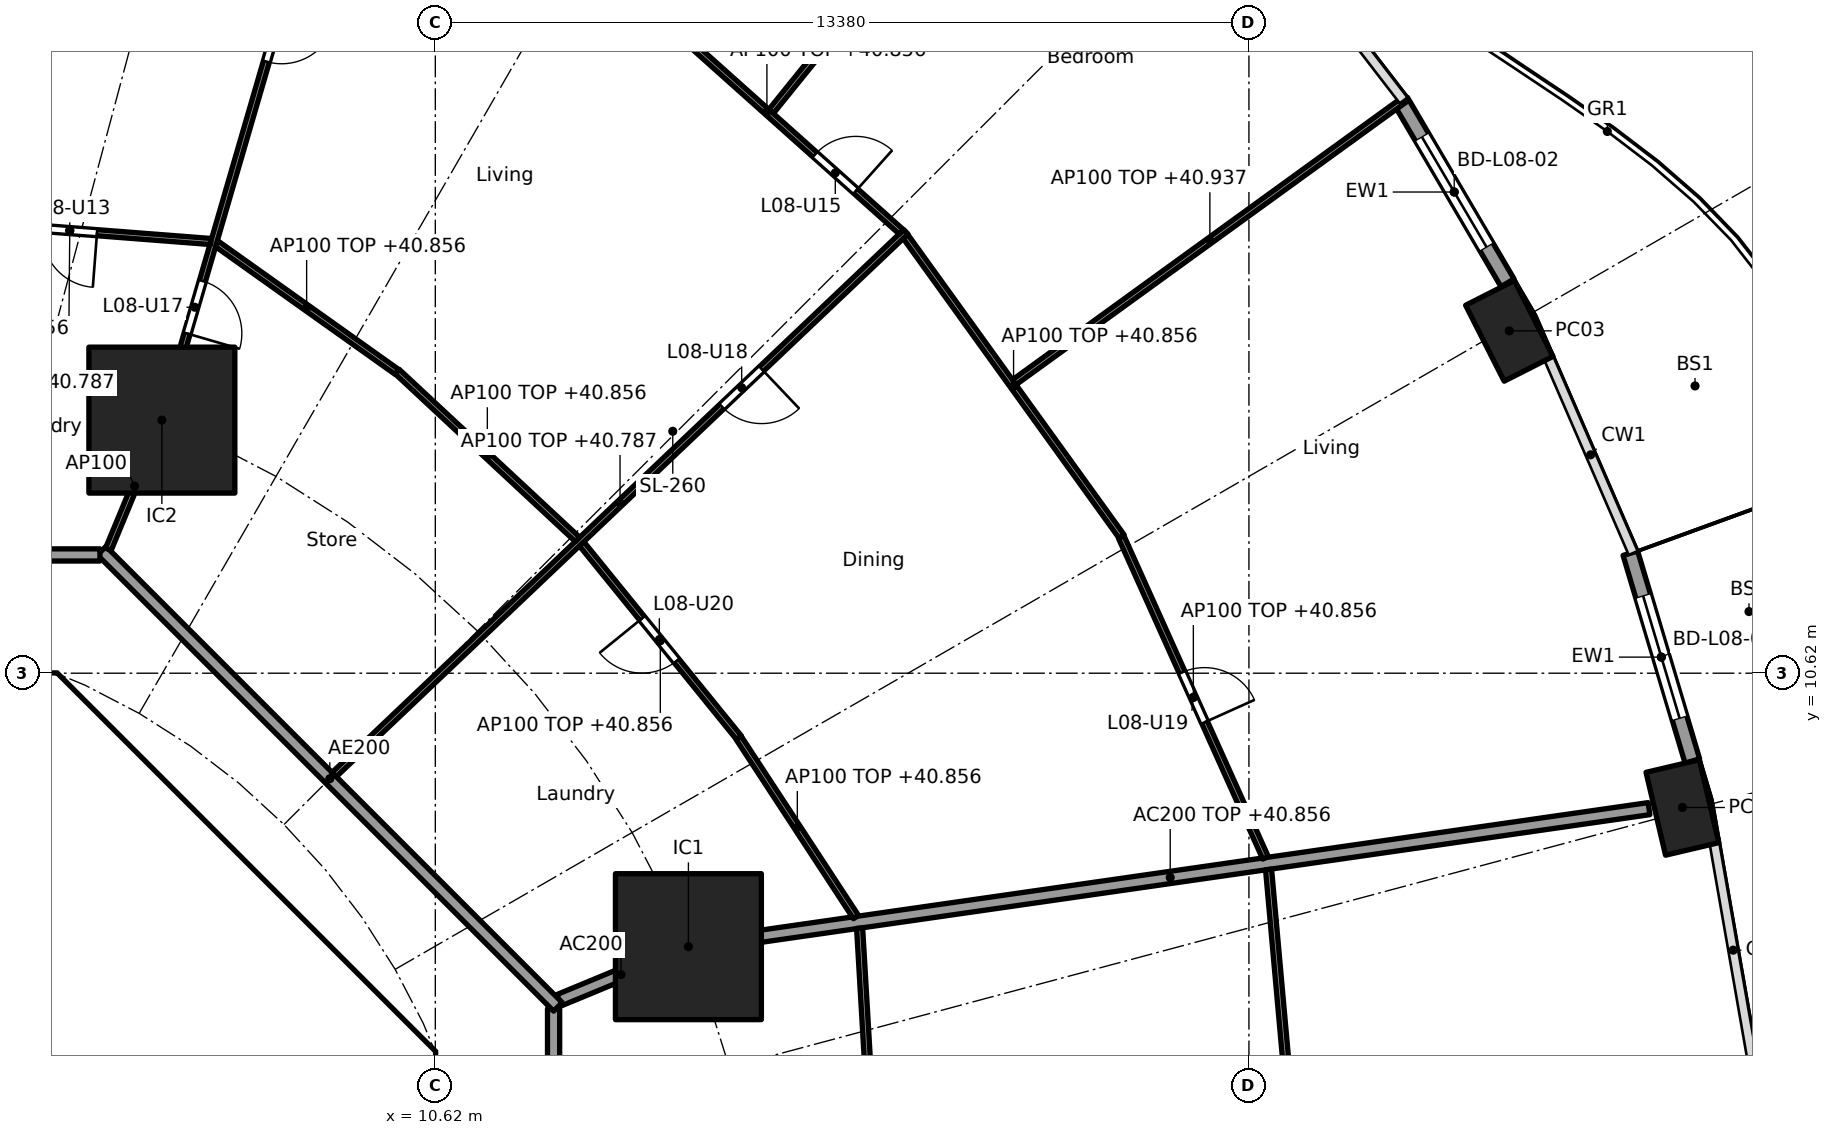
"""IFC4 building model, lengths in metres.
Left out: names, types, materials, properties, quantities, classifications, styles, units other than length and angle.
Written with IfcOpenShell. Run it as: python <this file> out.ifc"""

import sys

from ifc_helpers import new_model, si_unit, direction, frame, frame_2d, origin, origin_2d, place, context, subcontext, project, spatial, polyline, rectangle, hollow_rectangle, outline, extrude, element, fill, save


model = new_model("IFC4")
c1 = context("Model", 3, precision=1e-05, world=origin(), true_north=direction((0.0, 1.0)))
c2 = subcontext(c1, "Body", "Model", "MODEL_VIEW")
j1 = project(units=[si_unit("LENGTHUNIT", "METRE"), si_unit("PLANEANGLEUNIT", "RADIAN")], contexts=[c1])
p1 = place(None, origin())
s1 = spatial("IfcSite", under=j1, at=p1, CompositionType="ELEMENT")
p2 = place(p1, origin())
s2 = spatial("IfcBuilding", under=s1, at=p2, CompositionType="ELEMENT")
p3 = place(p2, frame((0.0, 0.0, 38.1)))
s3 = spatial("IfcBuildingStorey", under=s2, at=p3, CompositionType="ELEMENT", Elevation=38.1)
for number, where, z_axis, x_axis in (
    (1, (31.129, 8.412, 0.0), (0.0, 0.0, 1.0), (-0.229, 0.973, 0.0)),
    (2, (28.282, 16.25, 0.0), (0.0, 0.0, 1.0), (-0.452, 0.892, 0.0)),
):
    element("IfcColumn", number, at=place(p3, frame(where, z_axis=z_axis, x_axis=x_axis)), inside=s3, PredefinedType="COLUMN", context=c2, shape_type="SweptSolid", body=[
        extrude(hollow_rectangle(XDim=1.4, YDim=0.9, WallThickness=0.05, at=origin_2d()), origin(), (0.0, 0.0, 1.0), 3.7),
    ])
for number, where, z_axis, x_axis in (
    (3, (14.782, 6.123, 0.0), (0.0, 0.0, 1.0), (1.0, 0.0, 0.0)),
    (4, (6.123, 14.782, 0.0), (0.0, 0.0, 1.0), (1.0, 0.0, 0.0)),
):
    element("IfcColumn", number, at=place(p3, frame(where, z_axis=z_axis, x_axis=x_axis)), inside=s3, PredefinedType="COLUMN", context=c2, shape_type="SweptSolid", body=[
        extrude(rectangle(XDim=2.4, YDim=2.4, at=origin_2d()), origin(), (0.0, 0.0, 1.0), 3.7),
    ])
p4 = place(p3, frame((30.273, 12.593, 0.0), z_axis=(0.0, 0.0, 1.0), x_axis=(0.285871309426, -0.958268018065, 0.0)))
e5 = element("IfcWall", 5, at=p4, inside=s3, PredefinedType="SOLIDWALL", context=c2, shape_type="SweptSolid", body=[
    extrude(rectangle(XDim=3.565, YDim=0.25, at=frame_2d((1.783, 0.0))), origin(), (0.0, 0.0, 1.0), 3.44),
])
p5 = place(p4, frame((0.733, 0.0, 0.0)))
e6 = element("IfcOpeningElement", 6, at=p5, cuts=e5, PredefinedType="OPENING", context=c2, shape_type="SweptSolid", body=[
    extrude(rectangle(XDim=2.1, YDim=2.4, at=frame_2d((1.05, 1.2))), frame((0.0, 0.135, 0.0), z_axis=(0.0, -1.0, 0.0), x_axis=(1.0, 0.0, 0.0)), (0.0, 0.0, 1.0), 0.27),
])
p6 = place(p3, frame((26.5, 20.026, 0.0), z_axis=(0.0, 0.0, 1.0), x_axis=(0.506311160839, -0.862350861546, 0.0)))
e7 = element("IfcWall", 7, at=p6, inside=s3, PredefinedType="SOLIDWALL", context=c2, shape_type="SweptSolid", body=[
    extrude(rectangle(XDim=3.462, YDim=0.25, at=frame_2d((1.731, 0.0))), origin(), (0.0, 0.0, 1.0), 3.44),
])
p7 = place(p6, frame((0.681, 0.0, 0.0)))
e8 = element("IfcOpeningElement", 8, at=p7, cuts=e7, PredefinedType="OPENING", context=c2, shape_type="SweptSolid", body=[
    extrude(rectangle(XDim=2.1, YDim=2.4, at=frame_2d((1.05, 1.2))), frame((0.0, 0.135, 0.0), z_axis=(0.0, -1.0, 0.0), x_axis=(1.0, 0.0, 0.0)), (0.0, 0.0, 1.0), 0.27),
])
p8 = place(p3, frame((9.988, 4.613, 0.0), z_axis=(0.0, 0.0, 1.0), x_axis=(-0.707106781187, 0.707106781187, 0.0)))
e9 = element("IfcWall", 9, at=p8, inside=s3, PredefinedType="SHEAR", context=c2, shape_type="SweptSolid", body=[
    extrude(rectangle(XDim=7.602, YDim=0.6, at=frame_2d((3.801, 0.0))), origin(), (0.0, 0.0, 1.0), 3.44),
])
p9 = place(p8, frame((3.201, 0.0, 0.0)))
e10 = element("IfcOpeningElement", 10, at=p9, cuts=e9, PredefinedType="OPENING", context=c2, shape_type="SweptSolid", body=[
    extrude(rectangle(XDim=1.2, YDim=2.1, at=frame_2d((0.6, 1.05))), frame((0.0, 0.31, 0.0), z_axis=(0.0, -1.0, 0.0), x_axis=(1.0, 0.0, 0.0)), (0.0, 0.0, 1.0), 0.62),
])
p10 = place(p3, origin())
e11 = element("IfcWall", 11, at=p10, inside=s3, PredefinedType="SHEAR", context=c2, shape_type="SweptSolid", body=[
    extrude(outline(polyline([(-4.152, 10.025), (-4.401, 9.776), (-4.825, 10.2), (-4.401, 10.625), (4.401, 10.625), (4.825, 10.2), (4.401, 9.776), (4.152, 10.025), (-4.152, 10.025)])), origin(), (0.0, 0.0, 1.0), 3.44),
])
p11 = place(p3, origin())
e12 = element("IfcWall", 12, at=p11, inside=s3, PredefinedType="SHEAR", context=c2, shape_type="SweptSolid", body=[
    extrude(outline(polyline([(9.776, -4.401), (10.025, -4.152), (10.025, -3.801), (10.025, 4.152), (9.776, 4.401), (10.2, 4.825), (10.625, 4.401), (10.625, -4.401), (10.2, -4.825), (9.776, -4.401)])), origin(), (0.0, 0.0, 1.0), 3.44),
])
p12 = place(p3, frame((12.657, 5.243, 0.0), z_axis=(0.0, 0.0, 1.0), x_axis=(0.923853160736, 0.382747093259, 0.0)))
e13 = element("IfcWall", 13, at=p12, inside=s3, PredefinedType="PARTITIONING", context=c2, shape_type="SweptSolid", body=[
    extrude(rectangle(XDim=2.2, YDim=0.2, at=frame_2d((1.1, 0.0))), origin(), (0.0, 0.0, 1.0), 3.44),
])
p13 = place(p3, frame((14.832, 6.13, 0.0), z_axis=(0.0, 0.0, 1.0), x_axis=(0.989836541293, 0.142209779978, 0.0)))
e14 = element("IfcWall", 14, at=p13, inside=s3, PredefinedType="PARTITIONING", context=c2, shape_type="SweptSolid", body=[
    extrude(rectangle(XDim=15.909, YDim=0.2, at=frame_2d((7.955, 0.0))), origin(), (0.0, 0.0, 1.0), 2.756),
])
p14 = place(p3, frame((12.565, -5.104, 0.0), z_axis=(0.0, 0.0, 1.0), x_axis=(0.0, 1.0, 0.0)))
e15 = element("IfcWall", 15, at=p14, inside=s3, PredefinedType="PARTITIONING", context=c2, shape_type="SweptSolid", body=[
    extrude(rectangle(XDim=10.209, YDim=0.2, at=frame_2d((5.104, 0.0))), origin(), (0.0, 0.0, 1.0), 3.44),
])
p15 = place(p3, frame((12.635, 5.134, 0.0), z_axis=(0.0, 0.0, 1.0), x_axis=(-0.707106781187, 0.707106781187, 0.0)))
e16 = element("IfcWall", 16, at=p15, inside=s3, PredefinedType="PARTITIONING", context=c2, shape_type="SweptSolid", body=[
    extrude(rectangle(XDim=10.609, YDim=0.2, at=frame_2d((5.305, 0.0))), origin(), (0.0, 0.0, 1.0), 3.44),
])
p16 = place(p3, frame((5.104, 12.565, 0.0), z_axis=(0.0, 0.0, 1.0), x_axis=(-1.0, 0.0, 0.0)))
e17 = element("IfcWall", 17, at=p16, inside=s3, PredefinedType="PARTITIONING", context=c2, shape_type="SweptSolid", body=[
    extrude(rectangle(XDim=10.409, YDim=0.2, at=frame_2d((5.205, 0.0))), origin(), (0.0, 0.0, 1.0), 3.44),
])
p17 = place(p3, frame((17.971, 0.05, 0.0), z_axis=(0.0, 0.0, 1.0), x_axis=(-0.058513659907, 0.998286607946, 0.0)))
e18 = element("IfcWall", 18, at=p17, inside=s3, PredefinedType="PARTITIONING", context=c2, shape_type="SweptSolid", body=[
    extrude(rectangle(XDim=6.388, YDim=0.1, at=frame_2d((3.194, 0.0))), origin(), (0.0, 0.0, 1.0), 2.756),
])
p18 = place(p3, frame((24.982, 0.05, 0.0), z_axis=(0.0, 0.0, 1.0), x_axis=(-0.08944290521, 0.995991951126, 0.0)))
e19 = element("IfcWall", 19, at=p18, inside=s3, PredefinedType="PARTITIONING", context=c2, shape_type="SweptSolid", body=[
    extrude(rectangle(XDim=7.373, YDim=0.1, at=frame_2d((3.686, 0.0))), origin(), (0.0, 0.0, 1.0), 2.756),
])
p19 = place(p3, frame((17.537, 6.61, 0.0), z_axis=(0.0, 0.0, 1.0), x_axis=(-0.547637987196, 0.836715384692, 0.0)))
e20 = element("IfcWall", 20, at=p19, inside=s3, PredefinedType="PARTITIONING", context=c2, shape_type="SweptSolid", body=[
    extrude(rectangle(XDim=3.52, YDim=0.1, at=frame_2d((1.76, 0.0))), origin(), (0.0, 0.0, 1.0), 2.756),
])
p20 = place(p3, frame((24.273, 7.584, 0.0), z_axis=(0.0, 0.0, 1.0), x_axis=(-0.410201529109, 0.911994904326, 0.0)))
e21 = element("IfcWall", 21, at=p20, inside=s3, PredefinedType="PARTITIONING", context=c2, shape_type="SweptSolid", body=[
    extrude(rectangle(XDim=5.787, YDim=0.1, at=frame_2d((2.894, 0.0))), origin(), (0.0, 0.0, 1.0), 2.756),
])
p21 = place(p20, frame((2.444, 0.0, 0.0)))
e22 = element("IfcOpeningElement", 22, at=p21, cuts=e21, PredefinedType="OPENING", context=c2, shape_type="SweptSolid", body=[
    extrude(rectangle(XDim=0.9, YDim=2.1, at=frame_2d((0.45, 1.05))), frame((0.0, 0.06, 0.0), z_axis=(0.0, -1.0, 0.0), x_axis=(1.0, 0.0, 0.0)), (0.0, 0.0, 1.0), 0.12),
])
p22 = place(p3, frame((15.614, 9.559, 0.0), z_axis=(0.0, 0.0, 1.0), x_axis=(-0.63012473344, 0.776493928056, 0.0)))
e23 = element("IfcWall", 23, at=p22, inside=s3, PredefinedType="PARTITIONING", context=c2, shape_type="SweptSolid", body=[
    extrude(rectangle(XDim=4.106, YDim=0.1, at=frame_2d((2.053, 0.0))), origin(), (0.0, 0.0, 1.0), 2.756),
])
p23 = place(p22, frame((1.628, 0.0, 0.0)))
e24 = element("IfcOpeningElement", 24, at=p23, cuts=e23, PredefinedType="OPENING", context=c2, shape_type="SweptSolid", body=[
    extrude(rectangle(XDim=0.9, YDim=2.1, at=frame_2d((0.45, 1.05))), frame((0.0, 0.06, 0.0), z_axis=(0.0, -1.0, 0.0), x_axis=(1.0, 0.0, 0.0)), (0.0, 0.0, 1.0), 0.12),
])
p24 = place(p3, frame((21.908, 12.866, 0.0), z_axis=(0.0, 0.0, 1.0), x_axis=(-0.584558392935, 0.811351640936, 0.0)))
e25 = element("IfcWall", 25, at=p24, inside=s3, PredefinedType="PARTITIONING", context=c2, shape_type="SweptSolid", body=[
    extrude(rectangle(XDim=6.084, YDim=0.1, at=frame_2d((3.042, 0.0))), origin(), (0.0, 0.0, 1.0), 2.756),
])
p25 = place(p3, frame((20.141, 15.405, 0.0), z_axis=(0.0, 0.0, 1.0), x_axis=(0.809834895779, 0.58665785734, 0.0)))
e26 = element("IfcWall", 26, at=p25, inside=s3, PredefinedType="PARTITIONING", context=c2, shape_type="SweptSolid", body=[
    extrude(rectangle(XDim=7.945, YDim=0.1, at=frame_2d((3.973, 0.0))), origin(), (0.0, 0.0, 1.0), 2.837),
])
p26 = place(p3, frame((8.957, 8.953, 0.0), z_axis=(0.0, 0.0, 1.0), x_axis=(0.725250022034, 0.688485588476, 0.0)))
e27 = element("IfcWall", 27, at=p26, inside=s3, PredefinedType="PARTITIONING", context=c2, shape_type="SweptSolid", body=[
    extrude(rectangle(XDim=12.963, YDim=0.1, at=frame_2d((6.481, 0.0))), origin(), (0.0, 0.0, 1.0), 2.687),
])
p27 = place(p26, frame((8.79, 0.0, 0.0)))
e28 = element("IfcOpeningElement", 28, at=p27, cuts=e27, PredefinedType="OPENING", context=c2, shape_type="SweptSolid", body=[
    extrude(rectangle(XDim=0.9, YDim=2.1, at=frame_2d((0.45, 1.05))), frame((0.0, 0.06, 0.0), z_axis=(0.0, -1.0, 0.0), x_axis=(1.0, 0.0, 0.0)), (0.0, 0.0, 1.0), 0.12),
])
p28 = place(p3, frame((12.958, 12.82, 0.0), z_axis=(0.0, 0.0, 1.0), x_axis=(-0.732028724098, 0.681273768096, 0.0)))
e29 = element("IfcWall", 29, at=p28, inside=s3, PredefinedType="PARTITIONING", context=c2, shape_type="SweptSolid", body=[
    extrude(rectangle(XDim=4.05, YDim=0.1, at=frame_2d((2.025, 0.0))), origin(), (0.0, 0.0, 1.0), 2.756),
])
p29 = place(p3, frame((18.285, 17.877, 0.0), z_axis=(0.0, 0.0, 1.0), x_axis=(-0.745812746724, 0.666155647596, 0.0)))
e30 = element("IfcWall", 30, at=p29, inside=s3, PredefinedType="PARTITIONING", context=c2, shape_type="SweptSolid", body=[
    extrude(rectangle(XDim=5.931, YDim=0.1, at=frame_2d((2.965, 0.0))), origin(), (0.0, 0.0, 1.0), 2.756),
])
p30 = place(p29, frame((1.008, 0.0, 0.0)))
e31 = element("IfcOpeningElement", 31, at=p30, cuts=e30, PredefinedType="OPENING", context=c2, shape_type="SweptSolid", body=[
    extrude(rectangle(XDim=0.9, YDim=2.1, at=frame_2d((0.45, 1.05))), frame((0.0, 0.06, 0.0), z_axis=(0.0, -1.0, 0.0), x_axis=(1.0, 0.0, 0.0)), (0.0, 0.0, 1.0), 0.12),
])
p31 = place(p3, frame((16.142, 19.858, 0.0), z_axis=(0.0, 0.0, 1.0), x_axis=(0.628738066508, 0.777617157555, 0.0)))
e32 = element("IfcWall", 32, at=p31, inside=s3, PredefinedType="PARTITIONING", context=c2, shape_type="SweptSolid", body=[
    extrude(rectangle(XDim=8.091, YDim=0.1, at=frame_2d((4.045, 0.0))), origin(), (0.0, 0.0, 1.0), 2.837),
])
p32 = place(p3, frame((9.989, 15.574, 0.0), z_axis=(0.0, 0.0, 1.0), x_axis=(-0.81494477814, 0.57953861699, 0.0)))
e33 = element("IfcWall", 33, at=p32, inside=s3, PredefinedType="PARTITIONING", context=c2, shape_type="SweptSolid", body=[
    extrude(rectangle(XDim=3.644, YDim=0.1, at=frame_2d((1.822, 0.0))), origin(), (0.0, 0.0, 1.0), 2.756),
])
p33 = place(p3, frame((5.243, 12.657, 0.0), z_axis=(0.0, 0.0, 1.0), x_axis=(0.382719158442, 0.923864733477, 0.0)))
e34 = element("IfcWall", 34, at=p33, inside=s3, PredefinedType="PARTITIONING", context=c2, shape_type="SweptSolid", body=[
    extrude(rectangle(XDim=2.25, YDim=0.1, at=frame_2d((1.125, 0.0))), origin(), (0.0, 0.0, 1.0), 3.44),
])
p34 = place(p3, frame((6.137, 14.83, 0.0), z_axis=(0.0, 0.0, 1.0), x_axis=(0.27985745069, 0.960041565399, 0.0)))
e35 = element("IfcWall", 35, at=p34, inside=s3, PredefinedType="PARTITIONING", context=c2, shape_type="SweptSolid", body=[
    extrude(rectangle(XDim=16.705, YDim=0.1, at=frame_2d((8.353, 0.0))), origin(), (0.0, 0.0, 1.0), 2.756),
])
p35 = place(p34, frame((6.091, 0.0, 0.0)))
e36 = element("IfcOpeningElement", 36, at=p35, cuts=e35, PredefinedType="OPENING", context=c2, shape_type="SweptSolid", body=[
    extrude(rectangle(XDim=0.9, YDim=2.1, at=frame_2d((0.45, 1.05))), frame((0.0, 0.06, 0.0), z_axis=(0.0, -1.0, 0.0), x_axis=(1.0, 0.0, 0.0)), (0.0, 0.0, 1.0), 0.12),
])
p36 = place(p34, frame((1.434, 0.0, 0.0)))
e37 = element("IfcOpeningElement", 37, at=p36, cuts=e35, PredefinedType="OPENING", context=c2, shape_type="SweptSolid", body=[
    extrude(rectangle(XDim=0.9, YDim=2.1, at=frame_2d((0.45, 1.05))), frame((0.0, 0.06, 0.0), z_axis=(0.0, -1.0, 0.0), x_axis=(1.0, 0.0, 0.0)), (0.0, 0.0, 1.0), 0.12),
])
p37 = place(p3, frame((6.928, 17.719, 0.0), z_axis=(0.0, 0.0, 1.0), x_axis=(-0.997017959142, 0.077169872028, 0.0)))
e38 = element("IfcWall", 38, at=p37, inside=s3, PredefinedType="PARTITIONING", context=c2, shape_type="SweptSolid", body=[
    extrude(rectangle(XDim=4.654, YDim=0.1, at=frame_2d((2.327, 0.0))), origin(), (0.0, 0.0, 1.0), 2.756),
])
p38 = place(p37, frame((1.877, 0.0, 0.0)))
e39 = element("IfcOpeningElement", 39, at=p38, cuts=e38, PredefinedType="OPENING", context=c2, shape_type="SweptSolid", body=[
    extrude(rectangle(XDim=0.9, YDim=2.1, at=frame_2d((0.45, 1.05))), frame((0.0, 0.06, 0.0), z_axis=(0.0, -1.0, 0.0), x_axis=(1.0, 0.0, 0.0)), (0.0, 0.0, 1.0), 0.12),
])
p39 = place(p5, origin())
e40 = element("IfcDoor", 40, at=p39, inside=s3, OperationType="SLIDING_TO_LEFT", PredefinedType="DOOR", context=c2, shape_type="SweptSolid", body=[
    extrude(rectangle(XDim=2.1, YDim=2.4, at=frame_2d((1.05, 1.2))), frame((0.0, 0.025, 0.0), z_axis=(0.0, -1.0, 0.0), x_axis=(1.0, 0.0, 0.0)), (0.0, 0.0, 1.0), 0.05),
])
fill(e6, e40)
p40 = place(p7, origin())
e41 = element("IfcDoor", 41, at=p40, inside=s3, OperationType="SLIDING_TO_LEFT", PredefinedType="DOOR", context=c2, shape_type="SweptSolid", body=[
    extrude(rectangle(XDim=2.1, YDim=2.4, at=frame_2d((1.05, 1.2))), frame((0.0, 0.025, 0.0), z_axis=(0.0, -1.0, 0.0), x_axis=(1.0, 0.0, 0.0)), (0.0, 0.0, 1.0), 0.05),
])
fill(e8, e41)
p41 = place(p9, origin())
e42 = element("IfcDoor", 42, at=p41, inside=s3, OperationType="SINGLE_SWING_RIGHT", PredefinedType="DOOR", context=c2, shape_type="SweptSolid", body=[
    extrude(rectangle(XDim=1.2, YDim=2.1, at=frame_2d((0.6, 1.05))), frame((0.0, 0.025, 0.0), z_axis=(0.0, -1.0, 0.0), x_axis=(1.0, 0.0, 0.0)), (0.0, 0.0, 1.0), 0.05),
])
fill(e10, e42)
p42 = place(p38, origin())
e43 = element("IfcDoor", 43, at=p42, inside=s3, OperationType="SINGLE_SWING_LEFT", PredefinedType="DOOR", context=c2, shape_type="SweptSolid", body=[
    extrude(rectangle(XDim=0.9, YDim=2.1, at=frame_2d((0.45, 1.05))), frame((0.0, 0.025, 0.0), z_axis=(0.0, -1.0, 0.0), x_axis=(1.0, 0.0, 0.0)), (0.0, 0.0, 1.0), 0.05),
])
fill(e39, e43)
p43 = place(p35, frame((0.9, 0.0, 0.0), x_axis=(-1.0, 0.0, 0.0)))
e44 = element("IfcDoor", 44, at=p43, inside=s3, OperationType="SINGLE_SWING_LEFT", PredefinedType="DOOR", context=c2, shape_type="SweptSolid", body=[
    extrude(rectangle(XDim=0.9, YDim=2.1, at=frame_2d((0.45, 1.05))), frame((0.0, 0.025, 0.0), z_axis=(0.0, -1.0, 0.0), x_axis=(1.0, 0.0, 0.0)), (0.0, 0.0, 1.0), 0.05),
])
fill(e36, e44)
p44 = place(p30, frame((0.9, 0.0, 0.0), x_axis=(-1.0, 0.0, 0.0)))
e45 = element("IfcDoor", 45, at=p44, inside=s3, OperationType="SINGLE_SWING_RIGHT", PredefinedType="DOOR", context=c2, shape_type="SweptSolid", body=[
    extrude(rectangle(XDim=0.9, YDim=2.1, at=frame_2d((0.45, 1.05))), frame((0.0, 0.025, 0.0), z_axis=(0.0, -1.0, 0.0), x_axis=(1.0, 0.0, 0.0)), (0.0, 0.0, 1.0), 0.05),
])
fill(e31, e45)
p45 = place(p36, frame((0.9, 0.0, 0.0), x_axis=(-1.0, 0.0, 0.0)))
e46 = element("IfcDoor", 46, at=p45, inside=s3, OperationType="SINGLE_SWING_RIGHT", PredefinedType="DOOR", context=c2, shape_type="SweptSolid", body=[
    extrude(rectangle(XDim=0.9, YDim=2.1, at=frame_2d((0.45, 1.05))), frame((0.0, 0.025, 0.0), z_axis=(0.0, -1.0, 0.0), x_axis=(1.0, 0.0, 0.0)), (0.0, 0.0, 1.0), 0.05),
])
fill(e37, e46)
p46 = place(p27, frame((0.9, 0.0, 0.0), x_axis=(-1.0, 0.0, 0.0)))
e47 = element("IfcDoor", 47, at=p46, inside=s3, OperationType="SINGLE_SWING_LEFT", PredefinedType="DOOR", context=c2, shape_type="SweptSolid", body=[
    extrude(rectangle(XDim=0.9, YDim=2.1, at=frame_2d((0.45, 1.05))), frame((0.0, 0.025, 0.0), z_axis=(0.0, -1.0, 0.0), x_axis=(1.0, 0.0, 0.0)), (0.0, 0.0, 1.0), 0.05),
])
fill(e28, e47)
p47 = place(p21, frame((0.9, 0.0, 0.0), x_axis=(-1.0, 0.0, 0.0)))
e48 = element("IfcDoor", 48, at=p47, inside=s3, OperationType="SINGLE_SWING_RIGHT", PredefinedType="DOOR", context=c2, shape_type="SweptSolid", body=[
    extrude(rectangle(XDim=0.9, YDim=2.1, at=frame_2d((0.45, 1.05))), frame((0.0, 0.025, 0.0), z_axis=(0.0, -1.0, 0.0), x_axis=(1.0, 0.0, 0.0)), (0.0, 0.0, 1.0), 0.05),
])
fill(e22, e48)
p48 = place(p23, origin())
e49 = element("IfcDoor", 49, at=p48, inside=s3, OperationType="SINGLE_SWING_RIGHT", PredefinedType="DOOR", context=c2, shape_type="SweptSolid", body=[
    extrude(rectangle(XDim=0.9, YDim=2.1, at=frame_2d((0.45, 1.05))), frame((0.0, 0.025, 0.0), z_axis=(0.0, -1.0, 0.0), x_axis=(1.0, 0.0, 0.0)), (0.0, 0.0, 1.0), 0.05),
])
fill(e24, e49)
save(model, sys.argv[1])
